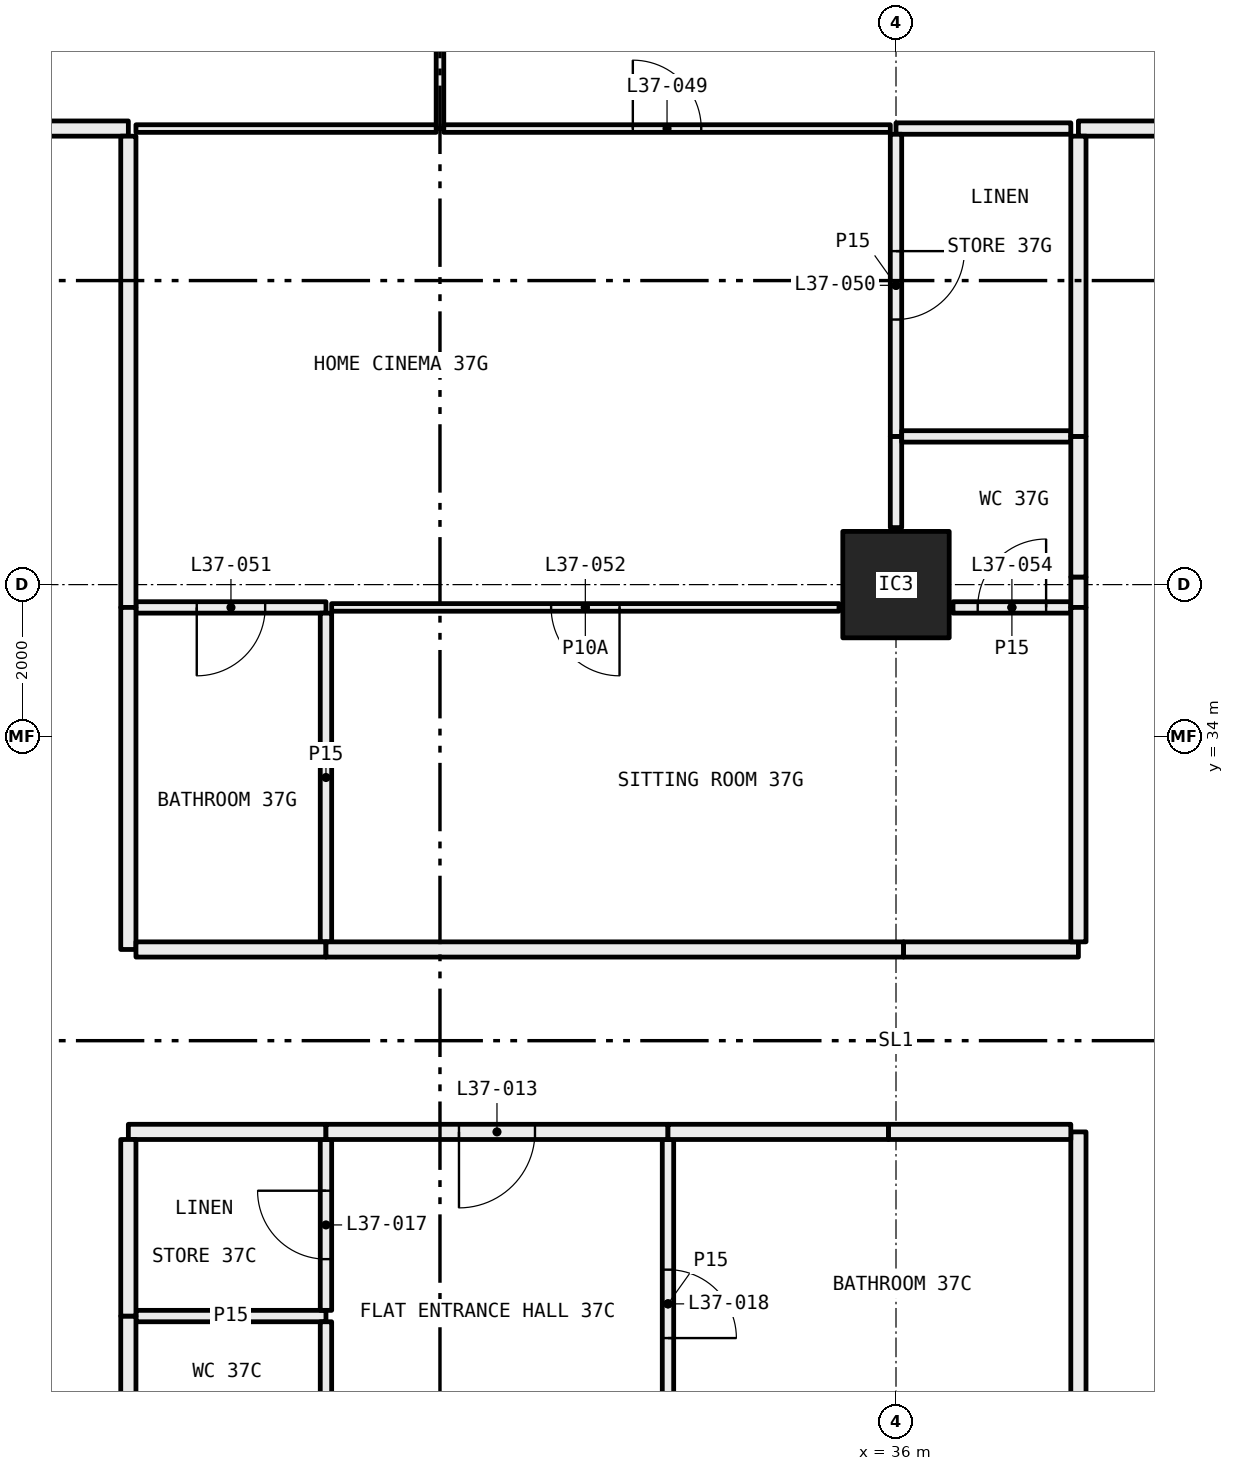
"""IFC4 building model, lengths in metres.
Left out: names, types, materials, properties, quantities, classifications, styles, units other than length and angle.
Written with IfcOpenShell. Run it as: python <this file> out.ifc"""

import sys

from ifc_helpers import new_model, si_unit, direction, frame, frame_2d, origin, origin_2d, place, context, subcontext, project, spatial, rectangle, hollow_rectangle, extrude, element, fill, save


model = new_model("IFC4")
c1 = context("Model", 3, precision=1e-05, world=origin(), true_north=direction((0.0, 1.0)))
c2 = subcontext(c1, "Body", "Model", "MODEL_VIEW")
j1 = project(units=[si_unit("LENGTHUNIT", "METRE"), si_unit("PLANEANGLEUNIT", "RADIAN")], contexts=[c1])
p1 = place(None, origin())
s1 = spatial("IfcSite", under=j1, at=p1, CompositionType="ELEMENT")
p2 = place(p1, origin())
s2 = spatial("IfcBuilding", under=s1, at=p2, CompositionType="ELEMENT")
p3 = place(p2, frame((0.0, 0.0, 141.45)))
s3 = spatial("IfcBuildingStorey", under=s2, at=p3, CompositionType="ELEMENT", Elevation=141.45)
p4 = place(p3, frame((36.0, 36.0, 0.0), z_axis=(0.0, 0.0, 1.0), x_axis=(1.0, 0.0, 0.0)))
e1 = element("IfcColumn", 1, at=p4, inside=s3, PredefinedType="COLUMN", context=c2, shape_type="SweptSolid", body=[
    extrude(hollow_rectangle(XDim=1.4, YDim=1.4, WallThickness=0.06, at=origin_2d()), origin(), (0.0, 0.0, 1.0), 3.05),
])
p5 = place(p3, frame((28.5, 26.377, 0.0), z_axis=(0.0, 0.0, 1.0), x_axis=(-1.0, 0.0, 0.0)))
e2 = element("IfcWall", 2, at=p5, inside=s3, PredefinedType="PARTITIONING", context=c2, shape_type="SweptSolid", body=[
    extrude(rectangle(XDim=2.5, YDim=0.15, at=frame_2d((1.25, 0.0))), origin(), (0.0, 0.0, 1.0), 3.05),
])
p6 = place(p3, frame((28.5, 24.375, 0.0), z_axis=(0.0, 0.0, 1.0), x_axis=(0.0, 1.0, 0.0)))
e3 = element("IfcWall", 3, at=p6, inside=s3, PredefinedType="PARTITIONING", context=c2, shape_type="SweptSolid", body=[
    extrude(rectangle(XDim=1.927, YDim=0.15, at=frame_2d((0.963, 0.0))), origin(), (0.0, 0.0, 1.0), 3.05),
])
p7 = place(p3, frame((25.9, 26.377, 0.0), z_axis=(0.0, 0.0, 1.0), x_axis=(0.0, -1.0, 0.0)))
e4 = element("IfcWall", 4, at=p7, inside=s3, PredefinedType="PARTITIONING", context=c2, shape_type="SweptSolid", body=[
    extrude(rectangle(XDim=2.077, YDim=0.2, at=frame_2d((1.039, 0.0))), origin(), (0.0, 0.0, 1.0), 3.05),
])
p8 = place(p3, frame((28.5, 26.452, 0.0), z_axis=(0.0, 0.0, 1.0), x_axis=(0.0, 1.0, 0.0)))
e5 = element("IfcWall", 5, at=p8, inside=s3, PredefinedType="PARTITIONING", context=c2, shape_type="SweptSolid", body=[
    extrude(rectangle(XDim=2.248, YDim=0.15, at=frame_2d((1.124, 0.0))), origin(), (0.0, 0.0, 1.0), 3.05),
])
p9 = place(p8, frame((0.674, 0.0, 0.0)))
e6 = element("IfcOpeningElement", 6, at=p9, cuts=e5, PredefinedType="OPENING", context=c2, shape_type="SweptSolid", body=[
    extrude(rectangle(XDim=0.9, YDim=2.1, at=frame_2d((0.45, 1.05))), frame((0.0, 0.085, 0.0), z_axis=(0.0, -1.0, 0.0), x_axis=(1.0, 0.0, 0.0)), (0.0, 0.0, 1.0), 0.17),
])
p10 = place(p3, frame((28.5, 28.8, 0.0), z_axis=(0.0, 0.0, 1.0), x_axis=(-1.0, 0.0, 0.0)))
e7 = element("IfcWall", 7, at=p10, inside=s3, PredefinedType="PARTITIONING", context=c2, shape_type="SweptSolid", body=[
    extrude(rectangle(XDim=2.6, YDim=0.2, at=frame_2d((1.3, 0.0))), origin(), (0.0, 0.0, 1.0), 3.05),
])
p11 = place(p3, frame((25.9, 28.7, 0.0), z_axis=(0.0, 0.0, 1.0), x_axis=(0.0, -1.0, 0.0)))
e8 = element("IfcWall", 8, at=p11, inside=s3, PredefinedType="PARTITIONING", context=c2, shape_type="SweptSolid", body=[
    extrude(rectangle(XDim=2.323, YDim=0.2, at=frame_2d((1.162, 0.0))), origin(), (0.0, 0.0, 1.0), 3.05),
])
p12 = place(p3, frame((33.0, 24.375, 0.0), z_axis=(0.0, 0.0, 1.0), x_axis=(0.0, 1.0, 0.0)))
e9 = element("IfcWall", 9, at=p12, inside=s3, PredefinedType="PARTITIONING", context=c2, shape_type="SweptSolid", body=[
    extrude(rectangle(XDim=4.325, YDim=0.15, at=frame_2d((2.163, 0.0))), origin(), (0.0, 0.0, 1.0), 3.05),
])
p13 = place(p12, frame((1.712, 0.0, 0.0)))
e10 = element("IfcOpeningElement", 10, at=p13, cuts=e9, PredefinedType="OPENING", context=c2, shape_type="SweptSolid", body=[
    extrude(rectangle(XDim=0.9, YDim=2.1, at=frame_2d((0.45, 1.05))), frame((0.0, 0.085, 0.0), z_axis=(0.0, -1.0, 0.0), x_axis=(1.0, 0.0, 0.0)), (0.0, 0.0, 1.0), 0.17),
])
p14 = place(p3, frame((33.0, 28.8, 0.0), z_axis=(0.0, 0.0, 1.0), x_axis=(-1.0, 0.0, 0.0)))
e11 = element("IfcWall", 11, at=p14, inside=s3, PredefinedType="PARTITIONING", context=c2, shape_type="SweptSolid", body=[
    extrude(rectangle(XDim=4.5, YDim=0.2, at=frame_2d((2.25, 0.0))), origin(), (0.0, 0.0, 1.0), 3.05),
])
p15 = place(p14, frame((1.75, 0.0, 0.0)))
e12 = element("IfcOpeningElement", 12, at=p15, cuts=e11, PredefinedType="OPENING", context=c2, shape_type="SweptSolid", body=[
    extrude(rectangle(XDim=1.0, YDim=2.1, at=frame_2d((0.5, 1.05))), frame((0.0, 0.11, 0.0), z_axis=(0.0, -1.0, 0.0), x_axis=(1.0, 0.0, 0.0)), (0.0, 0.0, 1.0), 0.22),
])
p16 = place(p3, frame((38.4, 24.3, 0.0), z_axis=(0.0, 0.0, 1.0), x_axis=(0.0, 1.0, 0.0)))
e13 = element("IfcWall", 13, at=p16, inside=s3, PredefinedType="PARTITIONING", context=c2, shape_type="SweptSolid", body=[
    extrude(rectangle(XDim=4.5, YDim=0.2, at=frame_2d((2.25, 0.0))), origin(), (0.0, 0.0, 1.0), 3.05),
])
p17 = place(p3, frame((38.3, 28.8, 0.0), z_axis=(0.0, 0.0, 1.0), x_axis=(-1.0, 0.0, 0.0)))
e14 = element("IfcWall", 14, at=p17, inside=s3, PredefinedType="PARTITIONING", context=c2, shape_type="SweptSolid", body=[
    extrude(rectangle(XDim=2.4, YDim=0.2, at=frame_2d((1.2, 0.0))), origin(), (0.0, 0.0, 1.0), 2.45),
])
p18 = place(p3, frame((35.9, 28.8, 0.0), z_axis=(0.0, 0.0, 1.0), x_axis=(-1.0, 0.0, 0.0)))
e15 = element("IfcWall", 15, at=p18, inside=s3, PredefinedType="PARTITIONING", context=c2, shape_type="SweptSolid", body=[
    extrude(rectangle(XDim=2.9, YDim=0.2, at=frame_2d((1.45, 0.0))), origin(), (0.0, 0.0, 1.0), 3.05),
])
p19 = place(p3, frame((30.0, 42.0, 0.0), z_axis=(0.0, 0.0, 1.0), x_axis=(0.0, 1.0, 0.0)))
e16 = element("IfcWall", 16, at=p19, inside=s3, PredefinedType="PARTITIONING", context=c2, shape_type="SweptSolid", body=[
    extrude(rectangle(XDim=3.0, YDim=0.1, at=frame_2d((1.5, 0.0))), origin(), (0.0, 0.0, 1.0), 3.05),
])
p20 = place(p19, frame((1.05, 0.0, 0.0)))
e17 = element("IfcOpeningElement", 17, at=p20, cuts=e16, PredefinedType="OPENING", context=c2, shape_type="SweptSolid", body=[
    extrude(rectangle(XDim=0.9, YDim=2.1, at=frame_2d((0.45, 1.05))), frame((0.0, 0.06, 0.0), z_axis=(0.0, -1.0, 0.0), x_axis=(1.0, 0.0, 0.0)), (0.0, 0.0, 1.0), 0.12),
])
p21 = place(p3, frame((26.0, 42.0, 0.0), z_axis=(0.0, 0.0, 1.0), x_axis=(1.0, 0.0, 0.0)))
e18 = element("IfcWall", 18, at=p21, inside=s3, PredefinedType="PARTITIONING", context=c2, shape_type="SweptSolid", body=[
    extrude(rectangle(XDim=3.95, YDim=0.1, at=frame_2d((1.975, 0.0))), origin(), (0.0, 0.0, 1.0), 3.05),
])
p22 = place(p3, frame((24.1, 42.0, 0.0), z_axis=(0.0, 0.0, 1.0), x_axis=(1.0, 0.0, 0.0)))
e19 = element("IfcWall", 19, at=p22, inside=s3, PredefinedType="PARTITIONING", context=c2, shape_type="SweptSolid", body=[
    extrude(rectangle(XDim=1.8, YDim=0.2, at=frame_2d((0.9, 0.0))), origin(), (0.0, 0.0, 1.0), 3.05),
])
p23 = place(p3, frame((30.05, 42.0, 0.0), z_axis=(0.0, 0.0, 1.0), x_axis=(1.0, 0.0, 0.0)))
e20 = element("IfcWall", 20, at=p23, inside=s3, PredefinedType="PARTITIONING", context=c2, shape_type="SweptSolid", body=[
    extrude(rectangle(XDim=5.875, YDim=0.1, at=frame_2d((2.938, 0.0))), origin(), (0.0, 0.0, 1.0), 2.45),
])
p24 = place(p23, frame((2.488, 0.0, 0.0)))
e21 = element("IfcOpeningElement", 21, at=p24, cuts=e20, PredefinedType="OPENING", context=c2, shape_type="SweptSolid", body=[
    extrude(rectangle(XDim=0.9, YDim=2.1, at=frame_2d((0.45, 1.05))), frame((0.0, 0.06, 0.0), z_axis=(0.0, -1.0, 0.0), x_axis=(1.0, 0.0, 0.0)), (0.0, 0.0, 1.0), 0.12),
])
p25 = place(p3, frame((36.0, 42.0, 0.0), z_axis=(0.0, 0.0, 1.0), x_axis=(1.0, 0.0, 0.0)))
e22 = element("IfcWall", 22, at=p25, inside=s3, PredefinedType="PARTITIONING", context=c2, shape_type="SweptSolid", body=[
    extrude(rectangle(XDim=2.3, YDim=0.15, at=frame_2d((1.15, 0.0))), origin(), (0.0, 0.0, 1.0), 2.45),
])
p26 = place(p3, frame((38.4, 42.0, 0.0), z_axis=(0.0, 0.0, 1.0), x_axis=(1.0, 0.0, 0.0)))
e23 = element("IfcWall", 23, at=p26, inside=s3, PredefinedType="PARTITIONING", context=c2, shape_type="SweptSolid", body=[
    extrude(rectangle(XDim=2.4, YDim=0.2, at=frame_2d((1.2, 0.0))), origin(), (0.0, 0.0, 1.0), 3.05),
])
p27 = place(p3, frame((36.0, 36.75, 0.0), z_axis=(0.0, 0.0, 1.0), x_axis=(0.0, 1.0, 0.0)))
e24 = element("IfcWall", 24, at=p27, inside=s3, PredefinedType="PARTITIONING", context=c2, shape_type="SweptSolid", body=[
    extrude(rectangle(XDim=1.2, YDim=0.15, at=frame_2d((0.6, 0.0))), origin(), (0.0, 0.0, 1.0), 2.45),
])
p28 = place(p3, frame((36.0, 37.95, 0.0), z_axis=(0.0, 0.0, 1.0), x_axis=(0.0, 1.0, 0.0)))
e25 = element("IfcWall", 25, at=p28, inside=s3, PredefinedType="PARTITIONING", context=c2, shape_type="SweptSolid", body=[
    extrude(rectangle(XDim=3.975, YDim=0.15, at=frame_2d((1.988, 0.0))), origin(), (0.0, 0.0, 1.0), 2.45),
])
p29 = place(p28, frame((1.538, 0.0, 0.0)))
e26 = element("IfcOpeningElement", 26, at=p29, cuts=e25, PredefinedType="OPENING", context=c2, shape_type="SweptSolid", body=[
    extrude(rectangle(XDim=0.9, YDim=2.1, at=frame_2d((0.45, 1.05))), frame((0.0, 0.085, 0.0), z_axis=(0.0, -1.0, 0.0), x_axis=(1.0, 0.0, 0.0)), (0.0, 0.0, 1.0), 0.17),
])
p30 = place(p3, frame((26.0, 35.7, 0.0), z_axis=(0.0, 0.0, 1.0), x_axis=(1.0, 0.0, 0.0)))
e27 = element("IfcWall", 27, at=p30, inside=s3, PredefinedType="PARTITIONING", context=c2, shape_type="SweptSolid", body=[
    extrude(rectangle(XDim=2.5, YDim=0.15, at=frame_2d((1.25, 0.0))), origin(), (0.0, 0.0, 1.0), 3.05),
])
p31 = place(p30, frame((0.8, 0.0, 0.0)))
e28 = element("IfcOpeningElement", 28, at=p31, cuts=e27, PredefinedType="OPENING", context=c2, shape_type="SweptSolid", body=[
    extrude(rectangle(XDim=0.9, YDim=2.1, at=frame_2d((0.45, 1.05))), frame((0.0, 0.085, 0.0), z_axis=(0.0, -1.0, 0.0), x_axis=(1.0, 0.0, 0.0)), (0.0, 0.0, 1.0), 0.17),
])
p32 = place(p3, frame((28.575, 35.7, 0.0), z_axis=(0.0, 0.0, 1.0), x_axis=(1.0, 0.0, 0.0)))
e29 = element("IfcWall", 29, at=p32, inside=s3, PredefinedType="PARTITIONING", context=c2, shape_type="SweptSolid", body=[
    extrude(rectangle(XDim=6.675, YDim=0.1, at=frame_2d((3.337, 0.0))), origin(), (0.0, 0.0, 1.0), 3.05),
])
p33 = place(p32, frame((2.887, 0.0, 0.0)))
e30 = element("IfcOpeningElement", 30, at=p33, cuts=e29, PredefinedType="OPENING", context=c2, shape_type="SweptSolid", body=[
    extrude(rectangle(XDim=0.9, YDim=2.1, at=frame_2d((0.45, 1.05))), frame((0.0, 0.06, 0.0), z_axis=(0.0, -1.0, 0.0), x_axis=(1.0, 0.0, 0.0)), (0.0, 0.0, 1.0), 0.12),
])
p34 = place(p3, frame((25.9, 41.9, 0.0), z_axis=(0.0, 0.0, 1.0), x_axis=(0.0, -1.0, 0.0)))
e31 = element("IfcWall", 31, at=p34, inside=s3, PredefinedType="PARTITIONING", context=c2, shape_type="SweptSolid", body=[
    extrude(rectangle(XDim=6.2, YDim=0.2, at=frame_2d((3.1, 0.0))), origin(), (0.0, 0.0, 1.0), 2.45),
])
p35 = place(p3, frame((38.3, 37.95, 0.0), z_axis=(0.0, 0.0, 1.0), x_axis=(-1.0, 0.0, 0.0)))
e32 = element("IfcWall", 32, at=p35, inside=s3, PredefinedType="PARTITIONING", context=c2, shape_type="SweptSolid", body=[
    extrude(rectangle(XDim=2.225, YDim=0.15, at=frame_2d((1.113, 0.0))), origin(), (0.0, 0.0, 1.0), 2.45),
])
p36 = place(p3, frame((36.75, 35.7, 0.0), z_axis=(0.0, 0.0, 1.0), x_axis=(1.0, 0.0, 0.0)))
e33 = element("IfcWall", 33, at=p36, inside=s3, PredefinedType="PARTITIONING", context=c2, shape_type="SweptSolid", body=[
    extrude(rectangle(XDim=1.55, YDim=0.15, at=frame_2d((0.775, 0.0))), origin(), (0.0, 0.0, 1.0), 3.05),
])
p37 = place(p36, frame((0.325, 0.0, 0.0)))
e34 = element("IfcOpeningElement", 34, at=p37, cuts=e33, PredefinedType="OPENING", context=c2, shape_type="SweptSolid", body=[
    extrude(rectangle(XDim=0.9, YDim=2.1, at=frame_2d((0.45, 1.05))), frame((0.0, 0.085, 0.0), z_axis=(0.0, -1.0, 0.0), x_axis=(1.0, 0.0, 0.0)), (0.0, 0.0, 1.0), 0.17),
])
p38 = place(p3, frame((38.4, 35.7, 0.0), z_axis=(0.0, 0.0, 1.0), x_axis=(0.0, 1.0, 0.0)))
e35 = element("IfcWall", 35, at=p38, inside=s3, PredefinedType="PARTITIONING", context=c2, shape_type="SweptSolid", body=[
    extrude(rectangle(XDim=0.4, YDim=0.2, at=frame_2d((0.2, 0.0))), origin(), (0.0, 0.0, 1.0), 2.45),
])
p39 = place(p3, frame((38.4, 36.1, 0.0), z_axis=(0.0, 0.0, 1.0), x_axis=(0.0, 1.0, 0.0)))
e36 = element("IfcWall", 36, at=p39, inside=s3, PredefinedType="PARTITIONING", context=c2, shape_type="SweptSolid", body=[
    extrude(rectangle(XDim=1.85, YDim=0.2, at=frame_2d((0.925, 0.0))), origin(), (0.0, 0.0, 1.0), 3.05),
])
p40 = place(p3, frame((38.4, 37.95, 0.0), z_axis=(0.0, 0.0, 1.0), x_axis=(0.0, 1.0, 0.0)))
e37 = element("IfcWall", 37, at=p40, inside=s3, PredefinedType="PARTITIONING", context=c2, shape_type="SweptSolid", body=[
    extrude(rectangle(XDim=3.95, YDim=0.2, at=frame_2d((1.975, 0.0))), origin(), (0.0, 0.0, 1.0), 3.05),
])
p41 = place(p3, frame((28.5, 31.3, 0.0), z_axis=(0.0, 0.0, 1.0), x_axis=(0.0, 1.0, 0.0)))
e38 = element("IfcWall", 38, at=p41, inside=s3, PredefinedType="PARTITIONING", context=c2, shape_type="SweptSolid", body=[
    extrude(rectangle(XDim=4.325, YDim=0.15, at=frame_2d((2.163, 0.0))), origin(), (0.0, 0.0, 1.0), 3.05),
])
p42 = place(p3, frame((25.9, 35.7, 0.0), z_axis=(0.0, 0.0, 1.0), x_axis=(0.0, -1.0, 0.0)))
e39 = element("IfcWall", 39, at=p42, inside=s3, PredefinedType="PARTITIONING", context=c2, shape_type="SweptSolid", body=[
    extrude(rectangle(XDim=4.5, YDim=0.2, at=frame_2d((2.25, 0.0))), origin(), (0.0, 0.0, 1.0), 3.05),
])
p43 = place(p3, frame((26.0, 31.2, 0.0), z_axis=(0.0, 0.0, 1.0), x_axis=(1.0, 0.0, 0.0)))
e40 = element("IfcWall", 40, at=p43, inside=s3, PredefinedType="PARTITIONING", context=c2, shape_type="SweptSolid", body=[
    extrude(rectangle(XDim=2.5, YDim=0.2, at=frame_2d((1.25, 0.0))), origin(), (0.0, 0.0, 1.0), 3.05),
])
p44 = place(p3, frame((28.5, 31.2, 0.0), z_axis=(0.0, 0.0, 1.0), x_axis=(1.0, 0.0, 0.0)))
e41 = element("IfcWall", 41, at=p44, inside=s3, PredefinedType="PARTITIONING", context=c2, shape_type="SweptSolid", body=[
    extrude(rectangle(XDim=7.6, YDim=0.2, at=frame_2d((3.8, 0.0))), origin(), (0.0, 0.0, 1.0), 2.45),
])
p45 = place(p3, frame((36.1, 31.2, 0.0), z_axis=(0.0, 0.0, 1.0), x_axis=(1.0, 0.0, 0.0)))
e42 = element("IfcWall", 42, at=p45, inside=s3, PredefinedType="PARTITIONING", context=c2, shape_type="SweptSolid", body=[
    extrude(rectangle(XDim=2.3, YDim=0.2, at=frame_2d((1.15, 0.0))), origin(), (0.0, 0.0, 1.0), 3.05),
])
p46 = place(p3, frame((38.4, 31.3, 0.0), z_axis=(0.0, 0.0, 1.0), x_axis=(0.0, 1.0, 0.0)))
e43 = element("IfcWall", 43, at=p46, inside=s3, PredefinedType="PARTITIONING", context=c2, shape_type="SweptSolid", body=[
    extrude(rectangle(XDim=4.4, YDim=0.2, at=frame_2d((2.2, 0.0))), origin(), (0.0, 0.0, 1.0), 3.05),
])
p47 = place(p15, origin())
e44 = element("IfcDoor", 44, at=p47, inside=s3, OperationType="SINGLE_SWING_LEFT", PredefinedType="DOOR", context=c2, shape_type="SweptSolid", body=[
    extrude(rectangle(XDim=1.0, YDim=2.1, at=frame_2d((0.5, 1.05))), frame((0.0, 0.025, 0.0), z_axis=(0.0, -1.0, 0.0), x_axis=(1.0, 0.0, 0.0)), (0.0, 0.0, 1.0), 0.05),
])
fill(e12, e44)
p48 = place(p9, origin())
e45 = element("IfcDoor", 45, at=p48, inside=s3, OperationType="SINGLE_SWING_LEFT", PredefinedType="DOOR", context=c2, shape_type="SweptSolid", body=[
    extrude(rectangle(XDim=0.9, YDim=2.1, at=frame_2d((0.45, 1.05))), frame((0.0, 0.025, 0.0), z_axis=(0.0, -1.0, 0.0), x_axis=(1.0, 0.0, 0.0)), (0.0, 0.0, 1.0), 0.05),
])
fill(e6, e45)
p49 = place(p13, frame((0.9, 0.0, 0.0), x_axis=(-1.0, 0.0, 0.0)))
e46 = element("IfcDoor", 46, at=p49, inside=s3, OperationType="SINGLE_SWING_LEFT", PredefinedType="DOOR", context=c2, shape_type="SweptSolid", body=[
    extrude(rectangle(XDim=0.9, YDim=2.1, at=frame_2d((0.45, 1.05))), frame((0.0, 0.025, 0.0), z_axis=(0.0, -1.0, 0.0), x_axis=(1.0, 0.0, 0.0)), (0.0, 0.0, 1.0), 0.05),
])
fill(e10, e46)
p50 = place(p24, origin())
e47 = element("IfcDoor", 47, at=p50, inside=s3, OperationType="SINGLE_SWING_RIGHT", PredefinedType="DOOR", context=c2, shape_type="SweptSolid", body=[
    extrude(rectangle(XDim=0.9, YDim=2.1, at=frame_2d((0.45, 1.05))), frame((0.0, 0.025, 0.0), z_axis=(0.0, -1.0, 0.0), x_axis=(1.0, 0.0, 0.0)), (0.0, 0.0, 1.0), 0.05),
])
fill(e21, e47)
p51 = place(p29, frame((0.9, 0.0, 0.0), x_axis=(-1.0, 0.0, 0.0)))
e48 = element("IfcDoor", 48, at=p51, inside=s3, OperationType="SINGLE_SWING_RIGHT", PredefinedType="DOOR", context=c2, shape_type="SweptSolid", body=[
    extrude(rectangle(XDim=0.9, YDim=2.1, at=frame_2d((0.45, 1.05))), frame((0.0, 0.025, 0.0), z_axis=(0.0, -1.0, 0.0), x_axis=(1.0, 0.0, 0.0)), (0.0, 0.0, 1.0), 0.05),
])
fill(e26, e48)
p52 = place(p31, frame((0.9, 0.0, 0.0), x_axis=(-1.0, 0.0, 0.0)))
e49 = element("IfcDoor", 49, at=p52, inside=s3, OperationType="SINGLE_SWING_LEFT", PredefinedType="DOOR", context=c2, shape_type="SweptSolid", body=[
    extrude(rectangle(XDim=0.9, YDim=2.1, at=frame_2d((0.45, 1.05))), frame((0.0, 0.025, 0.0), z_axis=(0.0, -1.0, 0.0), x_axis=(1.0, 0.0, 0.0)), (0.0, 0.0, 1.0), 0.05),
])
fill(e28, e49)
p53 = place(p33, frame((0.9, 0.0, 0.0), x_axis=(-1.0, 0.0, 0.0)))
e50 = element("IfcDoor", 50, at=p53, inside=s3, OperationType="SINGLE_SWING_RIGHT", PredefinedType="DOOR", context=c2, shape_type="SweptSolid", body=[
    extrude(rectangle(XDim=0.9, YDim=2.1, at=frame_2d((0.45, 1.05))), frame((0.0, 0.025, 0.0), z_axis=(0.0, -1.0, 0.0), x_axis=(1.0, 0.0, 0.0)), (0.0, 0.0, 1.0), 0.05),
])
fill(e30, e50)
p54 = place(p37, origin())
e51 = element("IfcDoor", 51, at=p54, inside=s3, OperationType="SINGLE_SWING_LEFT", PredefinedType="DOOR", context=c2, shape_type="SweptSolid", body=[
    extrude(rectangle(XDim=0.9, YDim=2.1, at=frame_2d((0.45, 1.05))), frame((0.0, 0.025, 0.0), z_axis=(0.0, -1.0, 0.0), x_axis=(1.0, 0.0, 0.0)), (0.0, 0.0, 1.0), 0.05),
])
fill(e34, e51)
save(model, sys.argv[1])
